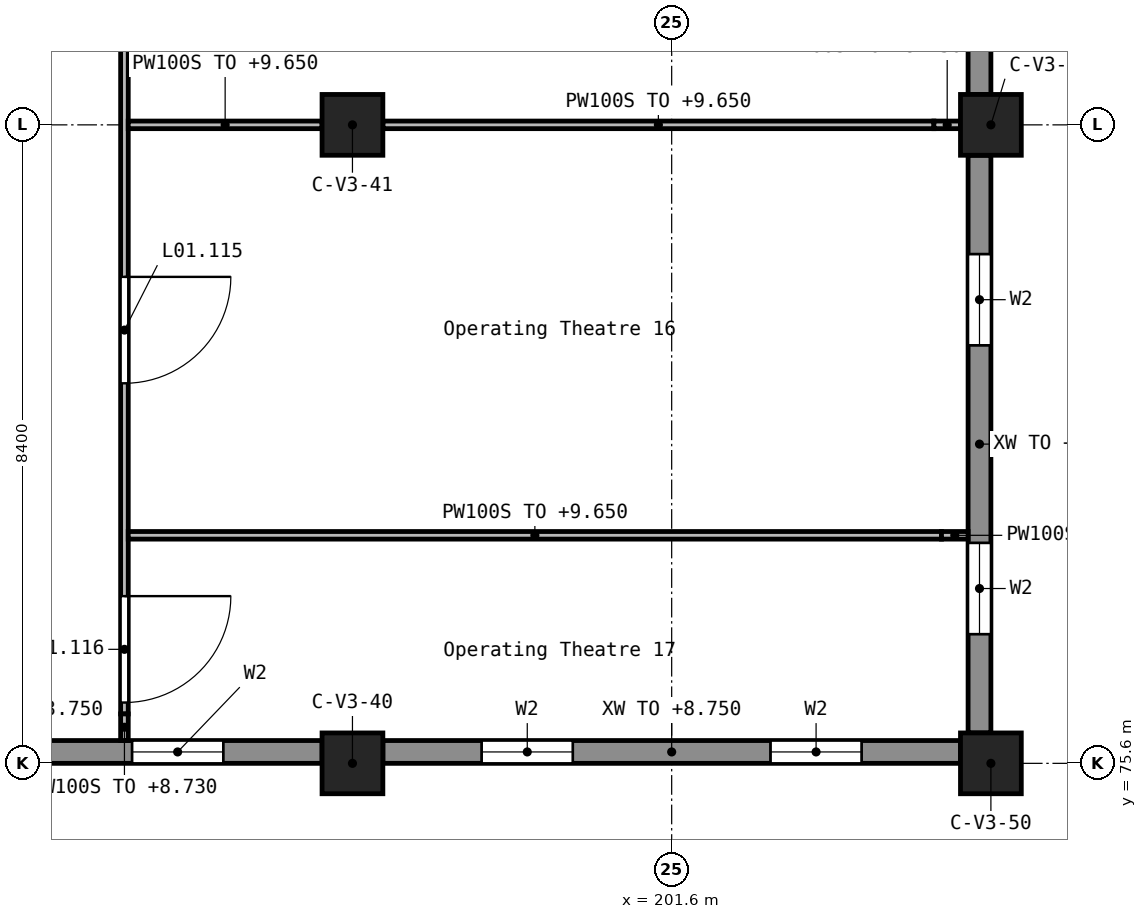
"""IFC4 building model, lengths in metres.
Left out: names, types, materials, properties, quantities, classifications, styles, units other than length and angle.
Written with IfcOpenShell. Run it as: python <this file> out.ifc"""

import sys

from ifc_helpers import new_model, si_unit, direction, frame, frame_2d, origin, origin_2d, place, context, subcontext, project, spatial, rectangle, extrude, element, fill, save


model = new_model("IFC4")
c1 = context("Model", 3, precision=1e-05, world=origin(), true_north=direction((0.0, 1.0)))
c2 = subcontext(c1, "Body", "Model", "MODEL_VIEW")
j1 = project(units=[si_unit("LENGTHUNIT", "METRE"), si_unit("PLANEANGLEUNIT", "RADIAN")], contexts=[c1])
p1 = place(None, origin())
s1 = spatial("IfcSite", under=j1, at=p1, CompositionType="ELEMENT")
p2 = place(p1, origin())
s2 = spatial("IfcBuilding", under=s1, at=p2, CompositionType="ELEMENT")
p3 = place(p2, frame((0.0, 0.0, 5.4)))
s3 = spatial("IfcBuildingStorey", under=s2, at=p3, CompositionType="ELEMENT", Elevation=5.4)
for number, where, z_axis, x_axis in (
    (1, (197.4, 75.6, 0.0), (0.0, 0.0, 1.0), (1.0, 0.0, 0.0)),
    (2, (197.4, 84.0, 0.0), (0.0, 0.0, 1.0), (1.0, 0.0, 0.0)),
    (3, (205.8, 75.6, 0.0), (0.0, 0.0, 1.0), (1.0, 0.0, 0.0)),
    (4, (205.8, 84.0, 0.0), (0.0, 0.0, 1.0), (1.0, 0.0, 0.0)),
):
    element("IfcColumn", number, at=place(p3, frame(where, z_axis=z_axis, x_axis=x_axis)), inside=s3, PredefinedType="COLUMN", context=c2, shape_type="SweptSolid", body=[
        extrude(rectangle(XDim=0.8, YDim=0.8, at=origin_2d()), origin(), (0.0, 0.0, 1.0), 4.5),
    ])
p4 = place(p3, frame((189.4, 75.75, 0.0), z_axis=(0.0, 0.0, 1.0), x_axis=(1.0, 0.0, 0.0)))
e5 = element("IfcWall", 5, at=p4, inside=s3, PredefinedType="STANDARD", context=c2, shape_type="SweptSolid", body=[
    extrude(rectangle(XDim=7.6, YDim=0.3, at=frame_2d((3.8, 0.0))), origin(), (0.0, 0.0, 1.0), 3.35),
])
p5 = place(p4, frame((0.65, 0.0, 1.2)))
e6 = element("IfcOpeningElement", 6, at=p5, cuts=e5, PredefinedType="OPENING", context=c2, shape_type="SweptSolid", body=[
    extrude(rectangle(XDim=1.2, YDim=1.2, at=frame_2d((0.6, 0.6))), frame((0.0, 0.16, 0.0), z_axis=(0.0, -1.0, 0.0), x_axis=(1.0, 0.0, 0.0)), (0.0, 0.0, 1.0), 0.32),
])
p6 = place(p4, frame((5.1, 0.0, 1.2)))
e7 = element("IfcOpeningElement", 7, at=p6, cuts=e5, PredefinedType="OPENING", context=c2, shape_type="SweptSolid", body=[
    extrude(rectangle(XDim=1.2, YDim=1.2, at=frame_2d((0.6, 0.6))), frame((0.0, 0.16, 0.0), z_axis=(0.0, -1.0, 0.0), x_axis=(1.0, 0.0, 0.0)), (0.0, 0.0, 1.0), 0.32),
])
p7 = place(p3, frame((197.8, 75.75, 0.0), z_axis=(0.0, 0.0, 1.0), x_axis=(1.0, 0.0, 0.0)))
e8 = element("IfcWall", 8, at=p7, inside=s3, PredefinedType="STANDARD", context=c2, shape_type="SweptSolid", body=[
    extrude(rectangle(XDim=7.6, YDim=0.3, at=frame_2d((3.8, 0.0))), origin(), (0.0, 0.0, 1.0), 3.35),
])
p8 = place(p7, frame((1.3, 0.0, 1.2)))
e9 = element("IfcOpeningElement", 9, at=p8, cuts=e8, PredefinedType="OPENING", context=c2, shape_type="SweptSolid", body=[
    extrude(rectangle(XDim=1.2, YDim=1.2, at=frame_2d((0.6, 0.6))), frame((0.0, 0.16, 0.0), z_axis=(0.0, -1.0, 0.0), x_axis=(1.0, 0.0, 0.0)), (0.0, 0.0, 1.0), 0.32),
])
p9 = place(p7, frame((5.1, 0.0, 1.2)))
e10 = element("IfcOpeningElement", 10, at=p9, cuts=e8, PredefinedType="OPENING", context=c2, shape_type="SweptSolid", body=[
    extrude(rectangle(XDim=1.2, YDim=1.2, at=frame_2d((0.6, 0.6))), frame((0.0, 0.16, 0.0), z_axis=(0.0, -1.0, 0.0), x_axis=(1.0, 0.0, 0.0)), (0.0, 0.0, 1.0), 0.32),
])
p10 = place(p3, frame((205.65, 76.0, 0.0), z_axis=(0.0, 0.0, 1.0), x_axis=(0.0, 1.0, 0.0)))
e11 = element("IfcWall", 11, at=p10, inside=s3, PredefinedType="STANDARD", context=c2, shape_type="SweptSolid", body=[
    extrude(rectangle(XDim=7.6, YDim=0.3, at=frame_2d((3.8, 0.0))), origin(), (0.0, 0.0, 1.0), 3.35),
])
p11 = place(p10, frame((1.3, 0.0, 1.2)))
e12 = element("IfcOpeningElement", 12, at=p11, cuts=e11, PredefinedType="OPENING", context=c2, shape_type="SweptSolid", body=[
    extrude(rectangle(XDim=1.2, YDim=1.2, at=frame_2d((0.6, 0.6))), frame((0.0, 0.16, 0.0), z_axis=(0.0, -1.0, 0.0), x_axis=(1.0, 0.0, 0.0)), (0.0, 0.0, 1.0), 0.32),
])
p12 = place(p10, frame((5.1, 0.0, 1.2)))
e13 = element("IfcOpeningElement", 13, at=p12, cuts=e11, PredefinedType="OPENING", context=c2, shape_type="SweptSolid", body=[
    extrude(rectangle(XDim=1.2, YDim=1.2, at=frame_2d((0.6, 0.6))), frame((0.0, 0.16, 0.0), z_axis=(0.0, -1.0, 0.0), x_axis=(1.0, 0.0, 0.0)), (0.0, 0.0, 1.0), 0.32),
])
p13 = place(p3, frame((205.65, 84.4, 0.0), z_axis=(0.0, 0.0, 1.0), x_axis=(0.0, 1.0, 0.0)))
e14 = element("IfcWall", 14, at=p13, inside=s3, PredefinedType="STANDARD", context=c2, shape_type="SweptSolid", body=[
    extrude(rectangle(XDim=7.6, YDim=0.3, at=frame_2d((3.8, 0.0))), origin(), (0.0, 0.0, 1.0), 3.35),
])
p14 = place(p13, frame((1.3, 0.0, 1.2)))
e15 = element("IfcOpeningElement", 15, at=p14, cuts=e14, PredefinedType="OPENING", context=c2, shape_type="SweptSolid", body=[
    extrude(rectangle(XDim=1.2, YDim=1.2, at=frame_2d((0.6, 0.6))), frame((0.0, 0.16, 0.0), z_axis=(0.0, -1.0, 0.0), x_axis=(1.0, 0.0, 0.0)), (0.0, 0.0, 1.0), 0.32),
])
p15 = place(p13, frame((5.1, 0.0, 1.2)))
e16 = element("IfcOpeningElement", 16, at=p15, cuts=e14, PredefinedType="OPENING", context=c2, shape_type="SweptSolid", body=[
    extrude(rectangle(XDim=1.2, YDim=1.2, at=frame_2d((0.6, 0.6))), frame((0.0, 0.16, 0.0), z_axis=(0.0, -1.0, 0.0), x_axis=(1.0, 0.0, 0.0)), (0.0, 0.0, 1.0), 0.32),
])
p16 = place(p3, frame((194.4, 94.25, 0.0), z_axis=(0.0, 0.0, 1.0), x_axis=(0.0, -1.0, 0.0)))
e17 = element("IfcWall", 17, at=p16, inside=s3, PredefinedType="PARTITIONING", context=c2, shape_type="SweptSolid", body=[
    extrude(rectangle(XDim=18.0, YDim=0.1, at=frame_2d((9.0, 0.0))), origin(), (0.0, 0.0, 1.0), 4.25),
])
p17 = place(p16, frame((0.25, 0.0, 0.0)))
e18 = element("IfcOpeningElement", 18, at=p17, cuts=e17, PredefinedType="OPENING", context=c2, shape_type="SweptSolid", body=[
    extrude(rectangle(XDim=1.4, YDim=2.1, at=frame_2d((0.7, 1.05))), frame((0.0, 0.06, 0.0), z_axis=(0.0, -1.0, 0.0), x_axis=(1.0, 0.0, 0.0)), (0.0, 0.0, 1.0), 0.12),
])
p18 = place(p16, frame((3.05, 0.0, 0.0)))
e19 = element("IfcOpeningElement", 19, at=p18, cuts=e17, PredefinedType="OPENING", context=c2, shape_type="SweptSolid", body=[
    extrude(rectangle(XDim=1.8, YDim=2.1, at=frame_2d((0.9, 1.05))), frame((0.0, 0.06, 0.0), z_axis=(0.0, -1.0, 0.0), x_axis=(1.0, 0.0, 0.0)), (0.0, 0.0, 1.0), 0.12),
])
p19 = place(p16, frame((7.45, 0.0, 0.0)))
e20 = element("IfcOpeningElement", 20, at=p19, cuts=e17, PredefinedType="OPENING", context=c2, shape_type="SweptSolid", body=[
    extrude(rectangle(XDim=1.4, YDim=2.1, at=frame_2d((0.7, 1.05))), frame((0.0, 0.06, 0.0), z_axis=(0.0, -1.0, 0.0), x_axis=(1.0, 0.0, 0.0)), (0.0, 0.0, 1.0), 0.12),
])
p20 = place(p16, frame((12.25, 0.0, 0.0)))
e21 = element("IfcOpeningElement", 21, at=p20, cuts=e17, PredefinedType="OPENING", context=c2, shape_type="SweptSolid", body=[
    extrude(rectangle(XDim=1.4, YDim=2.1, at=frame_2d((0.7, 1.05))), frame((0.0, 0.06, 0.0), z_axis=(0.0, -1.0, 0.0), x_axis=(1.0, 0.0, 0.0)), (0.0, 0.0, 1.0), 0.12),
])
p21 = place(p16, frame((16.45, 0.0, 0.0)))
e22 = element("IfcOpeningElement", 22, at=p21, cuts=e17, PredefinedType="OPENING", context=c2, shape_type="SweptSolid", body=[
    extrude(rectangle(XDim=1.4, YDim=2.1, at=frame_2d((0.7, 1.05))), frame((0.0, 0.06, 0.0), z_axis=(0.0, -1.0, 0.0), x_axis=(1.0, 0.0, 0.0)), (0.0, 0.0, 1.0), 0.12),
])
p22 = place(p3, frame((194.4, 76.25, 0.0), z_axis=(0.0, 0.0, 1.0), x_axis=(0.0, -1.0, 0.0)))
e23 = element("IfcWall", 23, at=p22, inside=s3, PredefinedType="PARTITIONING", context=c2, shape_type="SweptSolid", body=[
    extrude(rectangle(XDim=0.35, YDim=0.1, at=frame_2d((0.175, 0.0))), origin(), (0.0, 0.0, 1.0), 3.33),
])
p23 = place(p3, frame((194.45, 78.6, 0.0), z_axis=(0.0, 0.0, 1.0), x_axis=(1.0, 0.0, 0.0)))
e24 = element("IfcWall", 24, at=p23, inside=s3, PredefinedType="PARTITIONING", context=c2, shape_type="SweptSolid", body=[
    extrude(rectangle(XDim=10.7, YDim=0.1, at=frame_2d((5.35, 0.0))), origin(), (0.0, 0.0, 1.0), 4.25),
])
p24 = place(p3, frame((205.15, 78.6, 0.0), z_axis=(0.0, 0.0, 1.0), x_axis=(1.0, 0.0, 0.0)))
e25 = element("IfcWall", 25, at=p24, inside=s3, PredefinedType="PARTITIONING", context=c2, shape_type="SweptSolid", body=[
    extrude(rectangle(XDim=0.35, YDim=0.1, at=frame_2d((0.175, 0.0))), origin(), (0.0, 0.0, 1.0), 3.33),
])
p25 = place(p3, frame((194.45, 84.0, 0.0), z_axis=(0.0, 0.0, 1.0), x_axis=(1.0, 0.0, 0.0)))
e26 = element("IfcWall", 26, at=p25, inside=s3, PredefinedType="PARTITIONING", context=c2, shape_type="SweptSolid", body=[
    extrude(rectangle(XDim=2.55, YDim=0.1, at=frame_2d((1.275, 0.0))), origin(), (0.0, 0.0, 1.0), 4.25),
])
p26 = place(p3, frame((197.8, 84.0, 0.0), z_axis=(0.0, 0.0, 1.0), x_axis=(1.0, 0.0, 0.0)))
e27 = element("IfcWall", 27, at=p26, inside=s3, PredefinedType="PARTITIONING", context=c2, shape_type="SweptSolid", body=[
    extrude(rectangle(XDim=7.25, YDim=0.1, at=frame_2d((3.625, 0.0))), origin(), (0.0, 0.0, 1.0), 4.25),
])
p27 = place(p3, frame((205.05, 84.0, 0.0), z_axis=(0.0, 0.0, 1.0), x_axis=(1.0, 0.0, 0.0)))
e28 = element("IfcWall", 28, at=p27, inside=s3, PredefinedType="PARTITIONING", context=c2, shape_type="SweptSolid", body=[
    extrude(rectangle(XDim=0.35, YDim=0.1, at=frame_2d((0.175, 0.0))), origin(), (0.0, 0.0, 1.0), 3.33),
])
p28 = place(p6, origin())
e29 = element("IfcWindow", 29, at=p28, inside=s3, PartitioningType="SINGLE_PANEL", PredefinedType="WINDOW", context=c2, shape_type="SweptSolid", body=[
    extrude(rectangle(XDim=1.2, YDim=1.2, at=frame_2d((0.6, 0.6))), frame((0.0, 0.03, 0.0), z_axis=(0.0, -1.0, 0.0), x_axis=(1.0, 0.0, 0.0)), (0.0, 0.0, 1.0), 0.06),
])
fill(e7, e29)
p29 = place(p8, origin())
e30 = element("IfcWindow", 30, at=p29, inside=s3, PartitioningType="SINGLE_PANEL", PredefinedType="WINDOW", context=c2, shape_type="SweptSolid", body=[
    extrude(rectangle(XDim=1.2, YDim=1.2, at=frame_2d((0.6, 0.6))), frame((0.0, 0.03, 0.0), z_axis=(0.0, -1.0, 0.0), x_axis=(1.0, 0.0, 0.0)), (0.0, 0.0, 1.0), 0.06),
])
fill(e9, e30)
p30 = place(p9, origin())
e31 = element("IfcWindow", 31, at=p30, inside=s3, PartitioningType="SINGLE_PANEL", PredefinedType="WINDOW", context=c2, shape_type="SweptSolid", body=[
    extrude(rectangle(XDim=1.2, YDim=1.2, at=frame_2d((0.6, 0.6))), frame((0.0, 0.03, 0.0), z_axis=(0.0, -1.0, 0.0), x_axis=(1.0, 0.0, 0.0)), (0.0, 0.0, 1.0), 0.06),
])
fill(e10, e31)
p31 = place(p11, origin())
e32 = element("IfcWindow", 32, at=p31, inside=s3, PartitioningType="SINGLE_PANEL", PredefinedType="WINDOW", context=c2, shape_type="SweptSolid", body=[
    extrude(rectangle(XDim=1.2, YDim=1.2, at=frame_2d((0.6, 0.6))), frame((0.0, 0.03, 0.0), z_axis=(0.0, -1.0, 0.0), x_axis=(1.0, 0.0, 0.0)), (0.0, 0.0, 1.0), 0.06),
])
fill(e12, e32)
p32 = place(p12, origin())
e33 = element("IfcWindow", 33, at=p32, inside=s3, PartitioningType="SINGLE_PANEL", PredefinedType="WINDOW", context=c2, shape_type="SweptSolid", body=[
    extrude(rectangle(XDim=1.2, YDim=1.2, at=frame_2d((0.6, 0.6))), frame((0.0, 0.03, 0.0), z_axis=(0.0, -1.0, 0.0), x_axis=(1.0, 0.0, 0.0)), (0.0, 0.0, 1.0), 0.06),
])
fill(e13, e33)
p33 = place(p20, origin())
e34 = element("IfcDoor", 34, at=p33, inside=s3, OperationType="DOUBLE_DOOR_SINGLE_SWING", PredefinedType="DOOR", context=c2, shape_type="SweptSolid", body=[
    extrude(rectangle(XDim=1.4, YDim=2.1, at=frame_2d((0.7, 1.05))), frame((0.0, 0.025, 0.0), z_axis=(0.0, -1.0, 0.0), x_axis=(1.0, 0.0, 0.0)), (0.0, 0.0, 1.0), 0.05),
])
fill(e21, e34)
p34 = place(p21, origin())
e35 = element("IfcDoor", 35, at=p34, inside=s3, OperationType="DOUBLE_DOOR_SINGLE_SWING", PredefinedType="DOOR", context=c2, shape_type="SweptSolid", body=[
    extrude(rectangle(XDim=1.4, YDim=2.1, at=frame_2d((0.7, 1.05))), frame((0.0, 0.025, 0.0), z_axis=(0.0, -1.0, 0.0), x_axis=(1.0, 0.0, 0.0)), (0.0, 0.0, 1.0), 0.05),
])
fill(e22, e35)
save(model, sys.argv[1])
